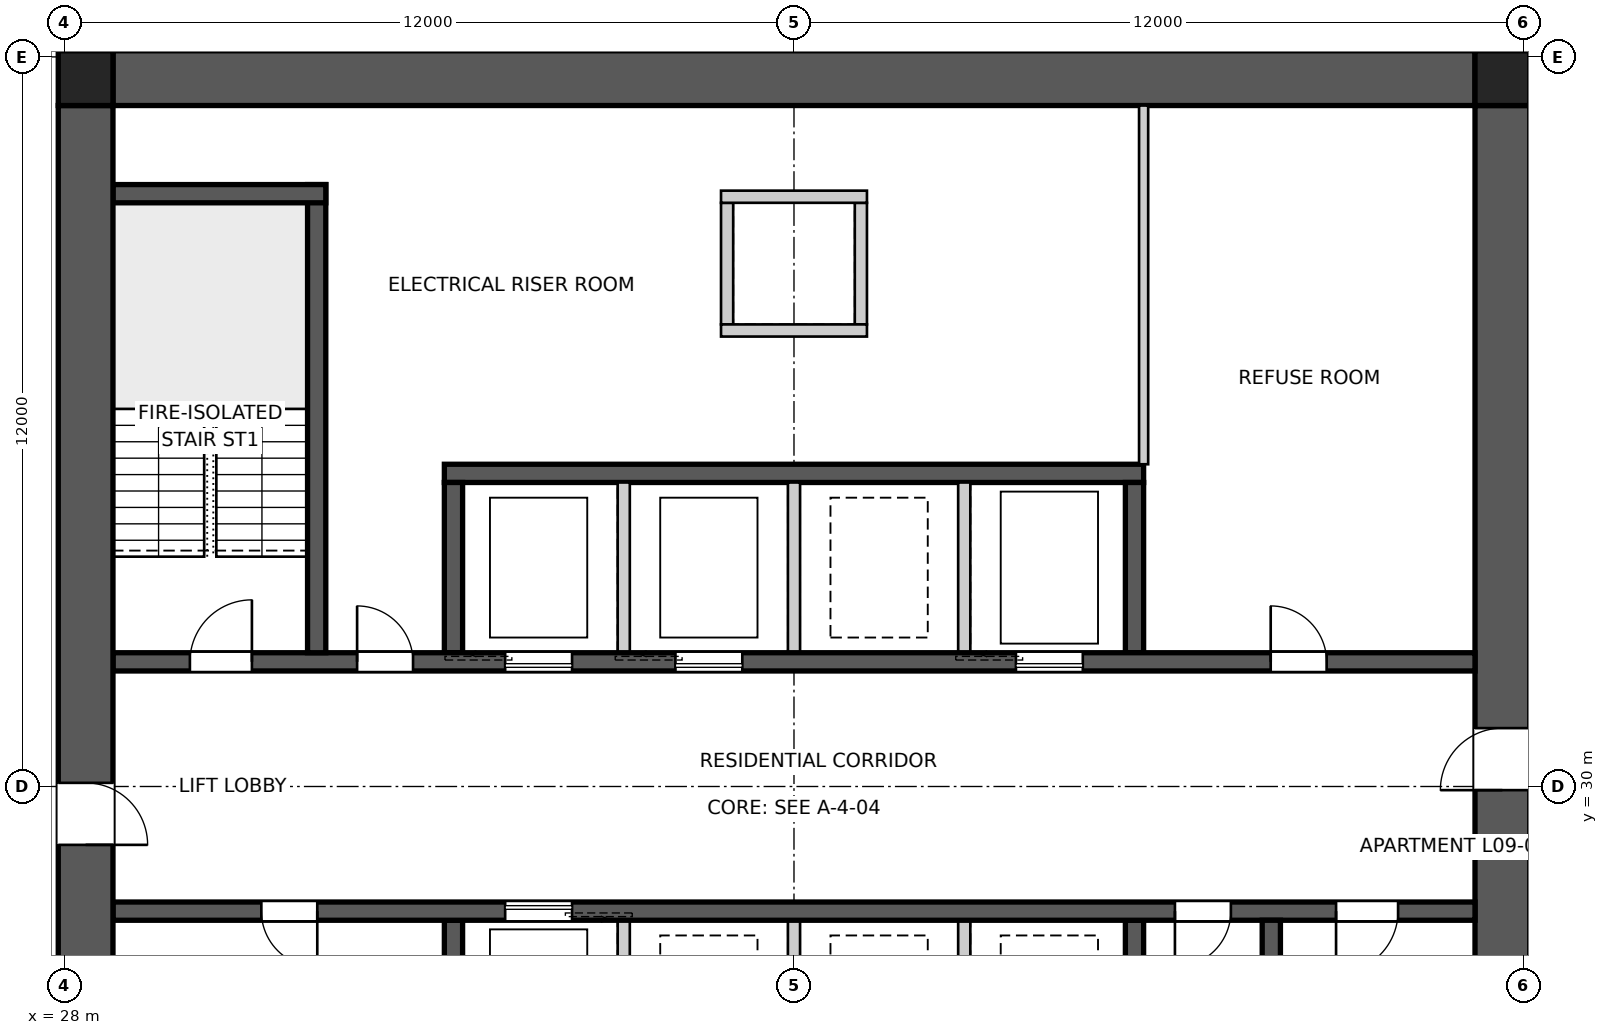
"""IFC4 building model, lengths in metres.
Left out: names, types, materials, properties, quantities, classifications, styles, units other than length and angle.
Written with IfcOpenShell. Run it as: python <this file> out.ifc"""

import sys

from ifc_helpers import new_model, si_unit, direction, frame, frame_2d, origin, origin_2d, place, context, subcontext, project, spatial, polyline, rectangle, outline, extrude, element, fill, save


model = new_model("IFC4")
c1 = context("Model", 3, precision=1e-05, world=origin(), true_north=direction((0.0, 1.0)))
c2 = subcontext(c1, "Body", "Model", "MODEL_VIEW")
j1 = project(units=[si_unit("LENGTHUNIT", "METRE"), si_unit("PLANEANGLEUNIT", "RADIAN")], contexts=[c1])
p1 = place(None, origin())
s1 = spatial("IfcSite", under=j1, at=p1, CompositionType="ELEMENT")
p2 = place(p1, origin())
s2 = spatial("IfcBuilding", under=s1, at=p2, CompositionType="ELEMENT")
p3 = place(p2, frame((0.0, 0.0, 35.4)))
s3 = spatial("IfcBuildingStorey", under=s2, at=p3, CompositionType="ELEMENT", Elevation=35.4)
p4 = place(p3, frame((28.8, 41.65, 0.0), z_axis=(0.0, 0.0, 1.0), x_axis=(1.0, 0.0, 0.0)))
e1 = element("IfcWall", 1, at=p4, inside=s3, PredefinedType="SHEAR", context=c2, shape_type="SweptSolid", body=[
    extrude(outline(polyline([(0.0, -0.45), (22.4, -0.45), (22.4, -0.025), (22.85, -0.025), (22.85, 0.025), (22.4, 0.025), (22.4, 0.45), (0.0, 0.45), (0.0, 0.025), (-0.45, 0.025), (-0.45, -0.025), (0.0, -0.025), (0.0, -0.45)])), origin(), (0.0, 0.0, 1.0), 3.4),
])
p5 = place(p3, frame((51.65, 18.8, 0.0), z_axis=(0.0, 0.0, 1.0), x_axis=(0.0, 1.0, 0.0)))
e2 = element("IfcWall", 2, at=p5, inside=s3, PredefinedType="SHEAR", context=c2, shape_type="SweptSolid", body=[
    extrude(outline(polyline([(0.0, -0.45), (22.4, -0.45), (22.4, -0.025), (22.85, -0.025), (22.85, 0.025), (22.4, 0.025), (22.4, 0.45), (0.0, 0.45), (0.0, 0.025), (-0.45, 0.025), (-0.45, -0.025), (0.0, -0.025), (0.0, -0.45)])), origin(), (0.0, 0.0, 1.0), 3.4),
])
p6 = place(p5, frame((11.14, 0.0, 0.0)))
e3 = element("IfcOpeningElement", 3, at=p6, cuts=e2, PredefinedType="OPENING", context=c2, shape_type="SweptSolid", body=[
    extrude(rectangle(XDim=1.02, YDim=2.4, at=frame_2d((0.51, 1.2))), frame((0.0, 0.46, 0.0), z_axis=(0.0, -1.0, 0.0), x_axis=(1.0, 0.0, 0.0)), (0.0, 0.0, 1.0), 0.92),
])
p7 = place(p3, frame((28.35, 41.2, 0.0), z_axis=(0.0, 0.0, 1.0), x_axis=(0.0, -1.0, 0.0)))
e4 = element("IfcWall", 4, at=p7, inside=s3, PredefinedType="SHEAR", context=c2, shape_type="SweptSolid", body=[
    extrude(outline(polyline([(0.0, -0.45), (22.4, -0.45), (22.4, -0.025), (22.85, -0.025), (22.85, 0.025), (22.4, 0.025), (22.4, 0.45), (0.0, 0.45), (0.0, 0.025), (-0.45, 0.025), (-0.45, -0.025), (0.0, -0.025), (0.0, -0.45)])), origin(), (0.0, 0.0, 1.0), 3.4),
])
p8 = place(p7, frame((11.14, 0.0, 0.0)))
e5 = element("IfcOpeningElement", 5, at=p8, cuts=e4, PredefinedType="OPENING", context=c2, shape_type="SweptSolid", body=[
    extrude(rectangle(XDim=1.02, YDim=2.4, at=frame_2d((0.51, 1.2))), frame((0.0, 0.46, 0.0), z_axis=(0.0, -1.0, 0.0), x_axis=(1.0, 0.0, 0.0)), (0.0, 0.0, 1.0), 0.92),
])
p9 = place(p3, frame((28.8, 32.05, 0.0), z_axis=(0.0, 0.0, 1.0), x_axis=(1.0, 0.0, 0.0)))
e6 = element("IfcWall", 6, at=p9, inside=s3, PredefinedType="SHEAR", context=c2, shape_type="SweptSolid", body=[
    extrude(rectangle(XDim=22.4, YDim=0.3, at=frame_2d((11.2, 0.0))), origin(), (0.0, 0.0, 1.0), 3.4),
])
p10 = place(p9, frame((19.04, 0.0, 0.0)))
e7 = element("IfcOpeningElement", 7, at=p10, cuts=e6, PredefinedType="OPENING", context=c2, shape_type="SweptSolid", body=[
    extrude(rectangle(XDim=0.92, YDim=2.1, at=frame_2d((0.46, 1.05))), frame((0.0, 0.16, 0.0), z_axis=(0.0, -1.0, 0.0), x_axis=(1.0, 0.0, 0.0)), (0.0, 0.0, 1.0), 0.32),
])
p11 = place(p9, frame((1.265, 0.0, 0.0)))
e8 = element("IfcOpeningElement", 8, at=p11, cuts=e6, PredefinedType="OPENING", context=c2, shape_type="SweptSolid", body=[
    extrude(rectangle(XDim=1.02, YDim=2.1, at=frame_2d((0.51, 1.05))), frame((0.0, 0.16, 0.0), z_axis=(0.0, -1.0, 0.0), x_axis=(1.0, 0.0, 0.0)), (0.0, 0.0, 1.0), 0.32),
])
p12 = place(p9, frame((4.015, 0.0, 0.0)))
e9 = element("IfcOpeningElement", 9, at=p12, cuts=e6, PredefinedType="OPENING", context=c2, shape_type="SweptSolid", body=[
    extrude(rectangle(XDim=0.92, YDim=2.1, at=frame_2d((0.46, 1.05))), frame((0.0, 0.16, 0.0), z_axis=(0.0, -1.0, 0.0), x_axis=(1.0, 0.0, 0.0)), (0.0, 0.0, 1.0), 0.32),
])
p13 = place(p9, frame((6.45, 0.0, 0.0)))
e10 = element("IfcOpeningElement", 10, at=p13, cuts=e6, PredefinedType="OPENING", context=c2, shape_type="SweptSolid", body=[
    extrude(rectangle(XDim=1.1, YDim=2.1, at=frame_2d((0.55, 1.05))), frame((0.0, 0.16, 0.0), z_axis=(0.0, -1.0, 0.0), x_axis=(1.0, 0.0, 0.0)), (0.0, 0.0, 1.0), 0.32),
])
p14 = place(p9, frame((9.25, 0.0, 0.0)))
e11 = element("IfcOpeningElement", 11, at=p14, cuts=e6, PredefinedType="OPENING", context=c2, shape_type="SweptSolid", body=[
    extrude(rectangle(XDim=1.1, YDim=2.1, at=frame_2d((0.55, 1.05))), frame((0.0, 0.16, 0.0), z_axis=(0.0, -1.0, 0.0), x_axis=(1.0, 0.0, 0.0)), (0.0, 0.0, 1.0), 0.32),
])
p15 = place(p9, frame((14.85, 0.0, 0.0)))
e12 = element("IfcOpeningElement", 12, at=p15, cuts=e6, PredefinedType="OPENING", context=c2, shape_type="SweptSolid", body=[
    extrude(rectangle(XDim=1.1, YDim=2.1, at=frame_2d((0.55, 1.05))), frame((0.0, 0.16, 0.0), z_axis=(0.0, -1.0, 0.0), x_axis=(1.0, 0.0, 0.0)), (0.0, 0.0, 1.0), 0.32),
])
p16 = place(p3, frame((51.2, 27.95, 0.0), z_axis=(0.0, 0.0, 1.0), x_axis=(-1.0, 0.0, 0.0)))
e13 = element("IfcWall", 13, at=p16, inside=s3, PredefinedType="SHEAR", context=c2, shape_type="SweptSolid", body=[
    extrude(rectangle(XDim=22.4, YDim=0.3, at=frame_2d((11.2, 0.0))), origin(), (0.0, 0.0, 1.0), 3.4),
])
p17 = place(p16, frame((19.04, 0.0, 0.0)))
e14 = element("IfcOpeningElement", 14, at=p17, cuts=e13, PredefinedType="OPENING", context=c2, shape_type="SweptSolid", body=[
    extrude(rectangle(XDim=0.92, YDim=2.1, at=frame_2d((0.46, 1.05))), frame((0.0, 0.16, 0.0), z_axis=(0.0, -1.0, 0.0), x_axis=(1.0, 0.0, 0.0)), (0.0, 0.0, 1.0), 0.32),
])
p18 = place(p16, frame((1.265, 0.0, 0.0)))
e15 = element("IfcOpeningElement", 15, at=p18, cuts=e13, PredefinedType="OPENING", context=c2, shape_type="SweptSolid", body=[
    extrude(rectangle(XDim=1.02, YDim=2.1, at=frame_2d((0.51, 1.05))), frame((0.0, 0.16, 0.0), z_axis=(0.0, -1.0, 0.0), x_axis=(1.0, 0.0, 0.0)), (0.0, 0.0, 1.0), 0.32),
])
p19 = place(p16, frame((4.015, 0.0, 0.0)))
e16 = element("IfcOpeningElement", 16, at=p19, cuts=e13, PredefinedType="OPENING", context=c2, shape_type="SweptSolid", body=[
    extrude(rectangle(XDim=0.92, YDim=2.1, at=frame_2d((0.46, 1.05))), frame((0.0, 0.16, 0.0), z_axis=(0.0, -1.0, 0.0), x_axis=(1.0, 0.0, 0.0)), (0.0, 0.0, 1.0), 0.32),
])
p20 = place(p16, frame((14.85, 0.0, 0.0)))
e17 = element("IfcOpeningElement", 17, at=p20, cuts=e13, PredefinedType="OPENING", context=c2, shape_type="SweptSolid", body=[
    extrude(rectangle(XDim=1.1, YDim=2.1, at=frame_2d((0.55, 1.05))), frame((0.0, 0.16, 0.0), z_axis=(0.0, -1.0, 0.0), x_axis=(1.0, 0.0, 0.0)), (0.0, 0.0, 1.0), 0.32),
])
p21 = place(p3, frame((34.25, 35.15, 0.0), z_axis=(0.0, 0.0, 1.0), x_axis=(1.0, 0.0, 0.0)))
e18 = element("IfcWall", 18, at=p21, inside=s3, PredefinedType="SHEAR", context=c2, shape_type="SweptSolid", body=[
    extrude(rectangle(XDim=11.5, YDim=0.3, at=frame_2d((5.75, 0.0))), origin(), (0.0, 0.0, 1.0), 3.4),
])
for number, where, z_axis, x_axis in (
    (19, (34.4, 32.2, 0.0), (0.0, 0.0, 1.0), (0.0, 1.0, 0.0)),
    (20, (45.6, 27.8, 0.0), (0.0, 0.0, 1.0), (0.0, -1.0, 0.0)),
):
    element("IfcWall", number, at=place(p3, frame(where, z_axis=z_axis, x_axis=x_axis)), inside=s3, PredefinedType="SHEAR", context=c2, shape_type="SweptSolid", body=[
        extrude(rectangle(XDim=2.8, YDim=0.3, at=frame_2d((1.4, 0.0))), origin(), (0.0, 0.0, 1.0), 3.4),
    ])
for number, where, z_axis, x_axis in (
    (21, (37.2, 32.2, 0.0), (0.0, 0.0, 1.0), (0.0, 1.0, 0.0)),
    (22, (42.8, 27.8, 0.0), (0.0, 0.0, 1.0), (0.0, -1.0, 0.0)),
    (23, (40.0, 32.2, 0.0), (0.0, 0.0, 1.0), (0.0, 1.0, 0.0)),
    (24, (40.0, 27.8, 0.0), (0.0, 0.0, 1.0), (0.0, -1.0, 0.0)),
    (25, (42.8, 32.2, 0.0), (0.0, 0.0, 1.0), (0.0, 1.0, 0.0)),
    (26, (37.2, 27.8, 0.0), (0.0, 0.0, 1.0), (0.0, -1.0, 0.0)),
):
    element("IfcWall", number, at=place(p3, frame(where, z_axis=z_axis, x_axis=x_axis)), inside=s3, PredefinedType="SOLIDWALL", context=c2, shape_type="SweptSolid", body=[
        extrude(rectangle(XDim=2.8, YDim=0.2, at=frame_2d((1.4, 0.0))), origin(), (0.0, 0.0, 1.0), 3.4),
    ])
for number, where, z_axis, x_axis in (
    (27, (45.6, 32.2, 0.0), (0.0, 0.0, 1.0), (0.0, 1.0, 0.0)),
    (28, (34.4, 27.8, 0.0), (0.0, 0.0, 1.0), (0.0, -1.0, 0.0)),
):
    element("IfcWall", number, at=place(p3, frame(where, z_axis=z_axis, x_axis=x_axis)), inside=s3, PredefinedType="SHEAR", context=c2, shape_type="SweptSolid", body=[
        extrude(rectangle(XDim=2.8, YDim=0.3, at=frame_2d((1.4, 0.0))), origin(), (0.0, 0.0, 1.0), 3.4),
    ])
p22 = place(p3, frame((32.15, 32.2, 0.0), z_axis=(0.0, 0.0, 1.0), x_axis=(0.0, 1.0, 0.0)))
e29 = element("IfcWall", 29, at=p22, inside=s3, PredefinedType="SHEAR", context=c2, shape_type="SweptSolid", body=[
    extrude(rectangle(XDim=7.7, YDim=0.3, at=frame_2d((3.85, 0.0))), origin(), (0.0, 0.0, 1.0), 3.4),
])
p23 = place(p3, frame((28.8, 39.75, 0.0), z_axis=(0.0, 0.0, 1.0), x_axis=(1.0, 0.0, 0.0)))
e30 = element("IfcWall", 30, at=p23, inside=s3, PredefinedType="SHEAR", context=c2, shape_type="SweptSolid", body=[
    extrude(rectangle(XDim=3.5, YDim=0.3, at=frame_2d((1.75, 0.0))), origin(), (0.0, 0.0, 1.0), 3.4),
])
p24 = place(p3, frame((47.85, 27.8, 0.0), z_axis=(0.0, 0.0, 1.0), x_axis=(0.0, -1.0, 0.0)))
e31 = element("IfcWall", 31, at=p24, inside=s3, PredefinedType="SHEAR", context=c2, shape_type="SweptSolid", body=[
    extrude(rectangle(XDim=7.7, YDim=0.3, at=frame_2d((3.85, 0.0))), origin(), (0.0, 0.0, 1.0), 3.4),
])
for number, where, z_axis, x_axis in (
    (32, (38.9, 37.6, 0.0), (0.0, 0.0, 1.0), (0.0, 1.0, 0.0)),
    (33, (41.1, 37.6, 0.0), (0.0, 0.0, 1.0), (0.0, 1.0, 0.0)),
):
    element("IfcWall", number, at=place(p3, frame(where, z_axis=z_axis, x_axis=x_axis)), inside=s3, PredefinedType="SOLIDWALL", context=c2, shape_type="SweptSolid", body=[
        extrude(rectangle(XDim=2.0, YDim=0.2, at=frame_2d((1.0, 0.0))), origin(), (0.0, 0.0, 1.0), 3.4),
    ])
for number, where, z_axis, x_axis in (
    (34, (38.8, 37.5, 0.0), (0.0, 0.0, 1.0), (1.0, 0.0, 0.0)),
    (35, (38.8, 39.7, 0.0), (0.0, 0.0, 1.0), (1.0, 0.0, 0.0)),
):
    element("IfcWall", number, at=place(p3, frame(where, z_axis=z_axis, x_axis=x_axis)), inside=s3, PredefinedType="SOLIDWALL", context=c2, shape_type="SweptSolid", body=[
        extrude(rectangle(XDim=2.4, YDim=0.2, at=frame_2d((1.2, 0.0))), origin(), (0.0, 0.0, 1.0), 3.4),
    ])
for number, where, z_axis, x_axis in (
    (36, (51.65, 41.65, 0.0), (0.0, 0.0, 1.0), (1.0, 0.0, 0.0)),
    (37, (28.35, 41.65, 0.0), (0.0, 0.0, 1.0), (1.0, 0.0, 0.0)),
):
    element("IfcColumn", number, at=place(p3, frame(where, z_axis=z_axis, x_axis=x_axis)), inside=s3, PredefinedType="COLUMN", context=c2, shape_type="SweptSolid", body=[
        extrude(rectangle(XDim=0.9, YDim=0.9, at=origin_2d()), origin(), (0.0, 0.0, 1.0), 3.4),
    ])
p25 = place(p3, frame((45.75, 41.2, 0.0), z_axis=(0.0, 0.0, 1.0), x_axis=(0.0, -1.0, 0.0)))
e38 = element("IfcWall", 38, at=p25, inside=s3, PredefinedType="SOLIDWALL", context=c2, shape_type="SweptSolid", body=[
    extrude(rectangle(XDim=5.9, YDim=0.15, at=frame_2d((2.95, 0.0))), origin(), (0.0, 0.0, 1.0), 3.25),
])
p26 = place(p10, origin())
e39 = element("IfcDoor", 39, at=p26, inside=s3, OperationType="SINGLE_SWING_LEFT", PredefinedType="DOOR", context=c2, shape_type="SweptSolid", body=[
    extrude(rectangle(XDim=0.92, YDim=2.1, at=frame_2d((0.46, 1.05))), frame((0.0, 0.025, 0.0), z_axis=(0.0, -1.0, 0.0), x_axis=(1.0, 0.0, 0.0)), (0.0, 0.0, 1.0), 0.05),
])
fill(e7, e39)
p27 = place(p17, origin())
e40 = element("IfcDoor", 40, at=p27, inside=s3, OperationType="SINGLE_SWING_LEFT", PredefinedType="DOOR", context=c2, shape_type="SweptSolid", body=[
    extrude(rectangle(XDim=0.92, YDim=2.1, at=frame_2d((0.46, 1.05))), frame((0.0, 0.025, 0.0), z_axis=(0.0, -1.0, 0.0), x_axis=(1.0, 0.0, 0.0)), (0.0, 0.0, 1.0), 0.05),
])
fill(e14, e40)
p28 = place(p18, origin())
e41 = element("IfcDoor", 41, at=p28, inside=s3, OperationType="SINGLE_SWING_RIGHT", PredefinedType="DOOR", context=c2, shape_type="SweptSolid", body=[
    extrude(rectangle(XDim=1.02, YDim=2.1, at=frame_2d((0.51, 1.05))), frame((0.0, 0.025, 0.0), z_axis=(0.0, -1.0, 0.0), x_axis=(1.0, 0.0, 0.0)), (0.0, 0.0, 1.0), 0.05),
])
fill(e15, e41)
p29 = place(p11, origin())
e42 = element("IfcDoor", 42, at=p29, inside=s3, OperationType="SINGLE_SWING_RIGHT", PredefinedType="DOOR", context=c2, shape_type="SweptSolid", body=[
    extrude(rectangle(XDim=1.02, YDim=2.1, at=frame_2d((0.51, 1.05))), frame((0.0, 0.025, 0.0), z_axis=(0.0, -1.0, 0.0), x_axis=(1.0, 0.0, 0.0)), (0.0, 0.0, 1.0), 0.05),
])
fill(e8, e42)
p30 = place(p12, origin())
e43 = element("IfcDoor", 43, at=p30, inside=s3, OperationType="SINGLE_SWING_LEFT", PredefinedType="DOOR", context=c2, shape_type="SweptSolid", body=[
    extrude(rectangle(XDim=0.92, YDim=2.1, at=frame_2d((0.46, 1.05))), frame((0.0, 0.025, 0.0), z_axis=(0.0, -1.0, 0.0), x_axis=(1.0, 0.0, 0.0)), (0.0, 0.0, 1.0), 0.05),
])
fill(e9, e43)
p31 = place(p19, origin())
e44 = element("IfcDoor", 44, at=p31, inside=s3, OperationType="SINGLE_SWING_RIGHT", PredefinedType="DOOR", context=c2, shape_type="SweptSolid", body=[
    extrude(rectangle(XDim=0.92, YDim=2.1, at=frame_2d((0.46, 1.05))), frame((0.0, 0.025, 0.0), z_axis=(0.0, -1.0, 0.0), x_axis=(1.0, 0.0, 0.0)), (0.0, 0.0, 1.0), 0.05),
])
fill(e16, e44)
p32 = place(p6, origin())
e45 = element("IfcDoor", 45, at=p32, inside=s3, OperationType="SINGLE_SWING_LEFT", PredefinedType="DOOR", context=c2, shape_type="SweptSolid", body=[
    extrude(rectangle(XDim=1.02, YDim=2.4, at=frame_2d((0.51, 1.2))), frame((0.0, 0.025, 0.0), z_axis=(0.0, -1.0, 0.0), x_axis=(1.0, 0.0, 0.0)), (0.0, 0.0, 1.0), 0.05),
])
fill(e3, e45)
p33 = place(p8, origin())
e46 = element("IfcDoor", 46, at=p33, inside=s3, OperationType="SINGLE_SWING_RIGHT", PredefinedType="DOOR", context=c2, shape_type="SweptSolid", body=[
    extrude(rectangle(XDim=1.02, YDim=2.4, at=frame_2d((0.51, 1.2))), frame((0.0, 0.025, 0.0), z_axis=(0.0, -1.0, 0.0), x_axis=(1.0, 0.0, 0.0)), (0.0, 0.0, 1.0), 0.05),
])
fill(e5, e46)
p34 = place(p13, origin())
e47 = element("IfcDoor", 47, at=p34, inside=s3, OperationType="SLIDING_TO_LEFT", PredefinedType="DOOR", context=c2, shape_type="SweptSolid", body=[
    extrude(rectangle(XDim=1.1, YDim=2.1, at=frame_2d((0.55, 1.05))), frame((0.0, 0.025, 0.0), z_axis=(0.0, -1.0, 0.0), x_axis=(1.0, 0.0, 0.0)), (0.0, 0.0, 1.0), 0.05),
])
fill(e10, e47)
p35 = place(p14, origin())
e48 = element("IfcDoor", 48, at=p35, inside=s3, OperationType="SLIDING_TO_LEFT", PredefinedType="DOOR", context=c2, shape_type="SweptSolid", body=[
    extrude(rectangle(XDim=1.1, YDim=2.1, at=frame_2d((0.55, 1.05))), frame((0.0, 0.025, 0.0), z_axis=(0.0, -1.0, 0.0), x_axis=(1.0, 0.0, 0.0)), (0.0, 0.0, 1.0), 0.05),
])
fill(e11, e48)
p36 = place(p15, origin())
e49 = element("IfcDoor", 49, at=p36, inside=s3, OperationType="SLIDING_TO_LEFT", PredefinedType="DOOR", context=c2, shape_type="SweptSolid", body=[
    extrude(rectangle(XDim=1.1, YDim=2.1, at=frame_2d((0.55, 1.05))), frame((0.0, 0.025, 0.0), z_axis=(0.0, -1.0, 0.0), x_axis=(1.0, 0.0, 0.0)), (0.0, 0.0, 1.0), 0.05),
])
fill(e12, e49)
p37 = place(p20, origin())
e50 = element("IfcDoor", 50, at=p37, inside=s3, OperationType="SLIDING_TO_LEFT", PredefinedType="DOOR", context=c2, shape_type="SweptSolid", body=[
    extrude(rectangle(XDim=1.1, YDim=2.1, at=frame_2d((0.55, 1.05))), frame((0.0, 0.025, 0.0), z_axis=(0.0, -1.0, 0.0), x_axis=(1.0, 0.0, 0.0)), (0.0, 0.0, 1.0), 0.05),
])
fill(e17, e50)
save(model, sys.argv[1])
